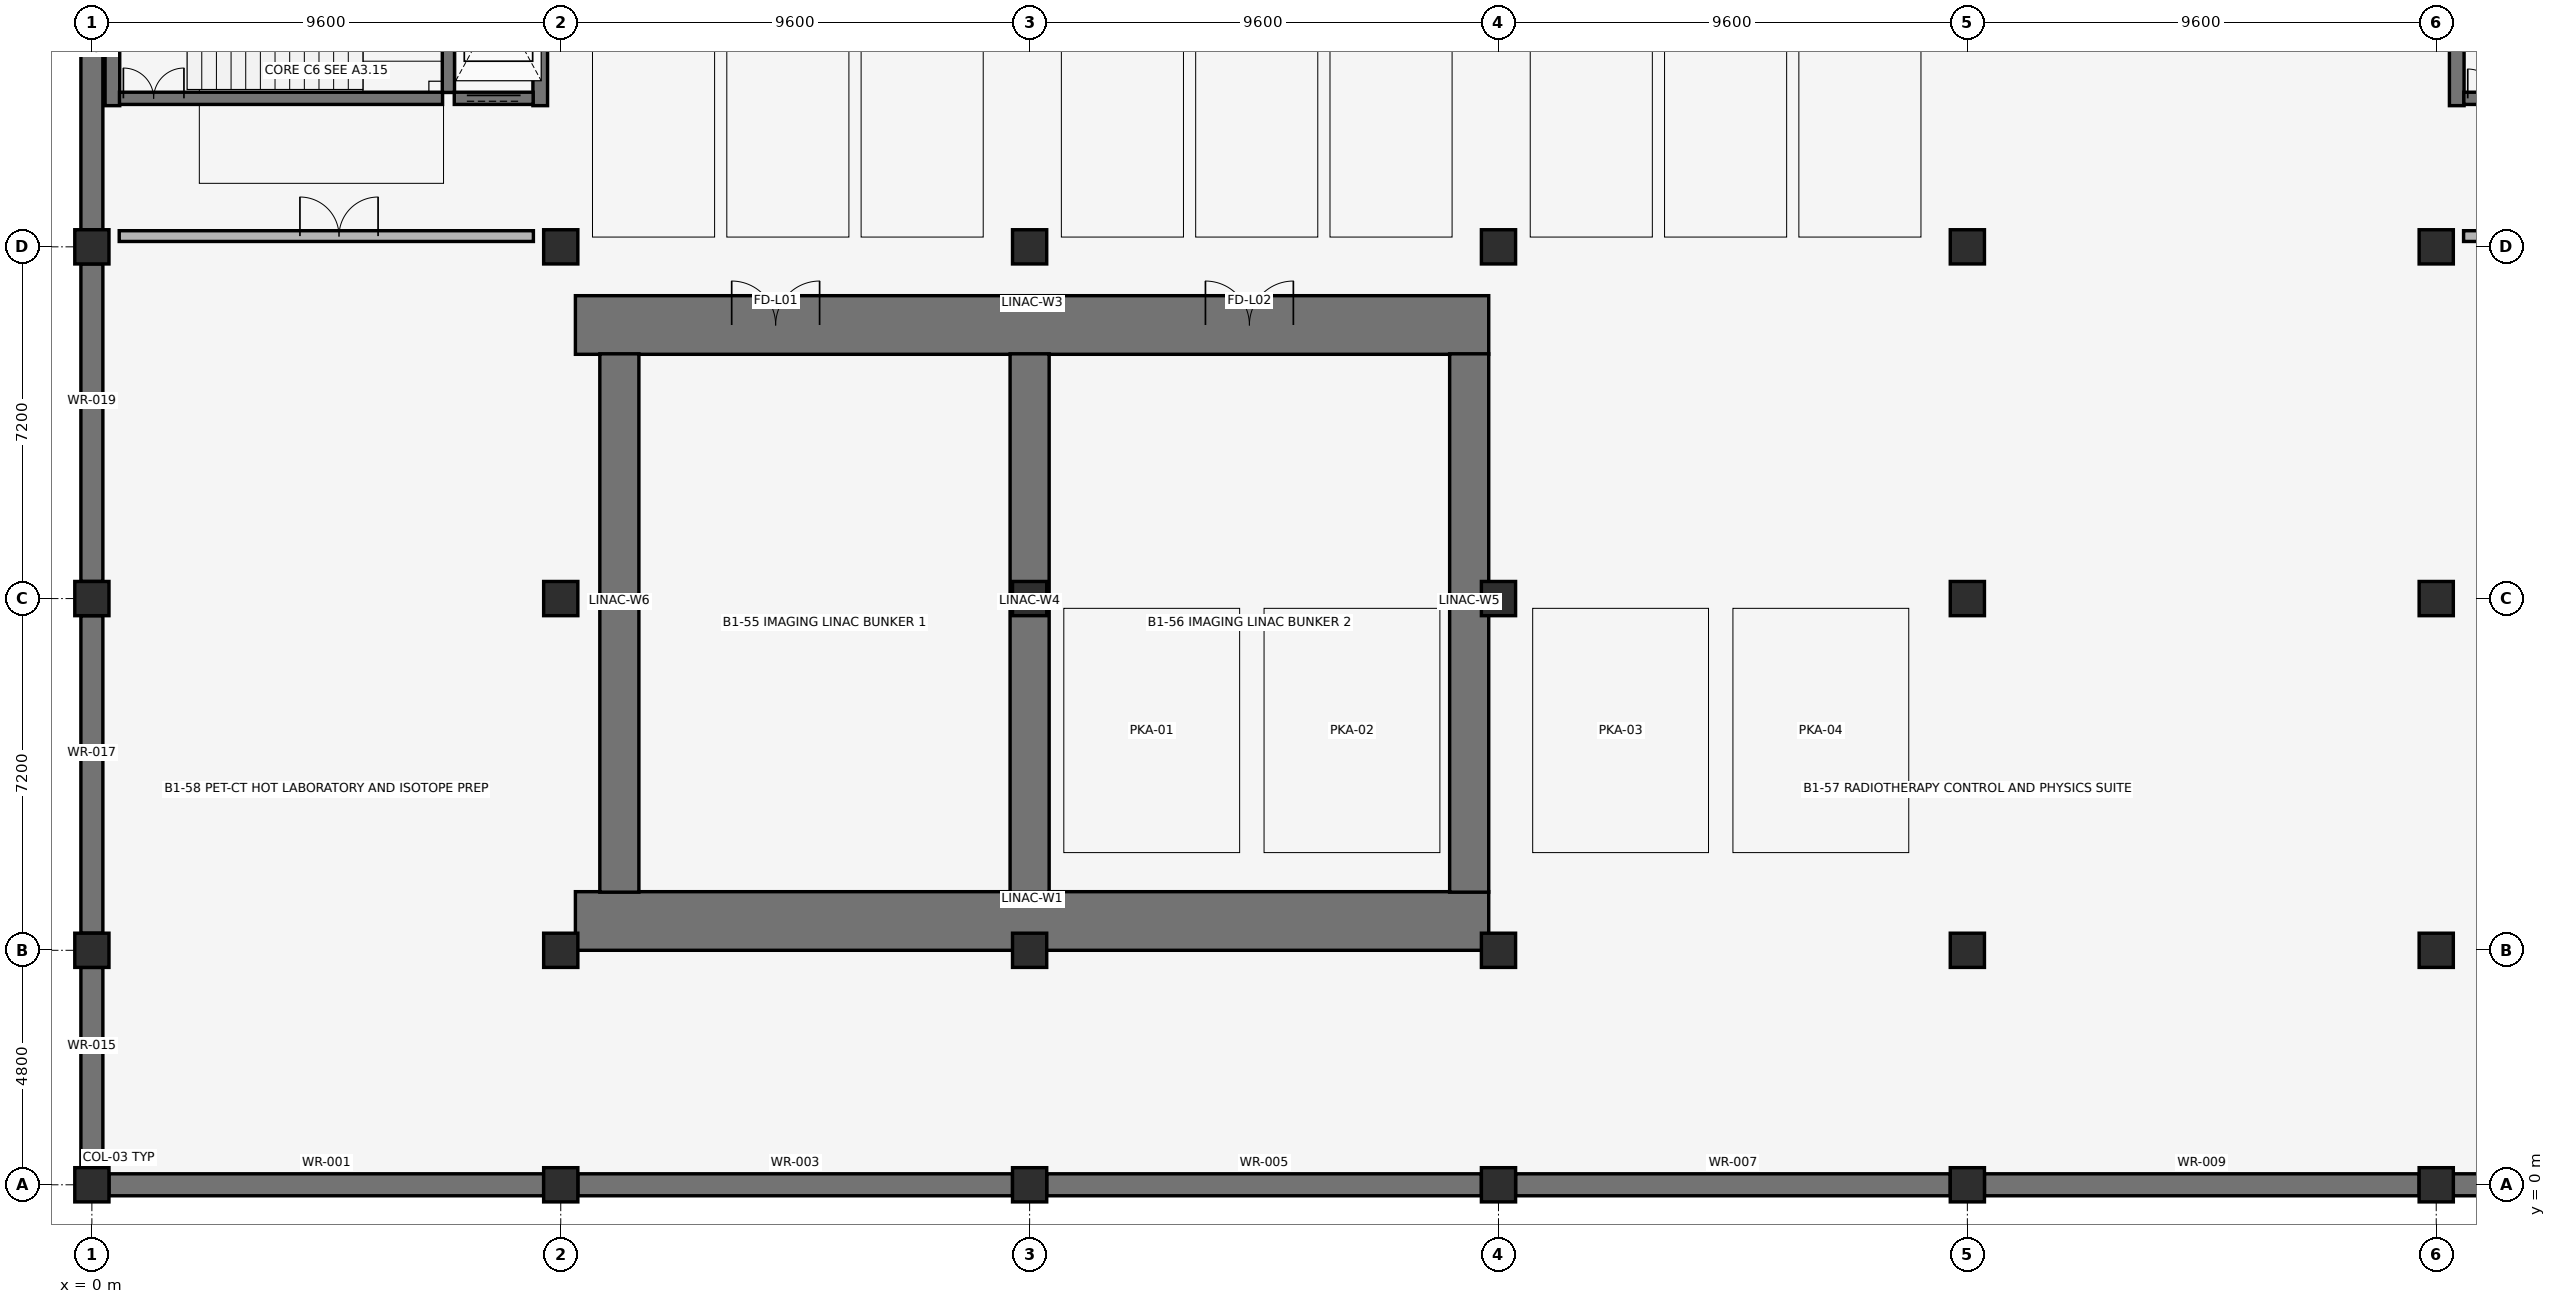
"""IFC4 building model, lengths in metres.
Left out: names, types, materials, properties, quantities, classifications, styles, units other than length and angle.
Written with IfcOpenShell. Run it as: python <this file> out.ifc"""

import sys

from ifc_helpers import new_model, si_unit, direction, frame, frame_2d, origin, origin_2d, place, context, subcontext, project, spatial, rectangle, extrude, element, fill, save


model = new_model("IFC4")
c1 = context("Model", 3, precision=1e-05, world=origin(), true_north=direction((0.0, 1.0)))
c2 = subcontext(c1, "Body", "Model", "MODEL_VIEW")
j1 = project(units=[si_unit("LENGTHUNIT", "METRE"), si_unit("PLANEANGLEUNIT", "RADIAN")], contexts=[c1])
p1 = place(None, origin())
s1 = spatial("IfcSite", under=j1, at=p1, CompositionType="ELEMENT")
p2 = place(p1, origin())
s2 = spatial("IfcBuilding", under=s1, at=p2, CompositionType="ELEMENT")
p3 = place(p2, frame((0.0, 0.0, -4.42)))
s3 = spatial("IfcBuildingStorey", under=s2, at=p3, CompositionType="ELEMENT", Elevation=-4.42)
for number, where, z_axis, x_axis in (
    (1, (0.0, 0.0, 0.0), (0.0, 0.0, 1.0), (1.0, 0.0, 0.0)),
    (2, (0.0, 4.8, 0.0), (0.0, 0.0, 1.0), (1.0, 0.0, 0.0)),
    (3, (0.0, 12.0, 0.0), (0.0, 0.0, 1.0), (1.0, 0.0, 0.0)),
    (4, (0.0, 19.2, 0.0), (0.0, 0.0, 1.0), (1.0, 0.0, 0.0)),
    (5, (9.6, 0.0, 0.0), (0.0, 0.0, 1.0), (1.0, 0.0, 0.0)),
    (6, (9.6, 4.8, 0.0), (0.0, 0.0, 1.0), (1.0, 0.0, 0.0)),
    (7, (9.6, 12.0, 0.0), (0.0, 0.0, 1.0), (1.0, 0.0, 0.0)),
    (8, (9.6, 19.2, 0.0), (0.0, 0.0, 1.0), (1.0, 0.0, 0.0)),
    (9, (19.2, 0.0, 0.0), (0.0, 0.0, 1.0), (1.0, 0.0, 0.0)),
    (10, (19.2, 4.8, 0.0), (0.0, 0.0, 1.0), (1.0, 0.0, 0.0)),
    (11, (19.2, 12.0, 0.0), (0.0, 0.0, 1.0), (1.0, 0.0, 0.0)),
    (12, (19.2, 19.2, 0.0), (0.0, 0.0, 1.0), (1.0, 0.0, 0.0)),
    (13, (28.8, 0.0, 0.0), (0.0, 0.0, 1.0), (1.0, 0.0, 0.0)),
    (14, (28.8, 4.8, 0.0), (0.0, 0.0, 1.0), (1.0, 0.0, 0.0)),
    (15, (28.8, 12.0, 0.0), (0.0, 0.0, 1.0), (1.0, 0.0, 0.0)),
    (16, (28.8, 19.2, 0.0), (0.0, 0.0, 1.0), (1.0, 0.0, 0.0)),
    (17, (38.4, 0.0, 0.0), (0.0, 0.0, 1.0), (1.0, 0.0, 0.0)),
    (18, (38.4, 4.8, 0.0), (0.0, 0.0, 1.0), (1.0, 0.0, 0.0)),
    (19, (38.4, 12.0, 0.0), (0.0, 0.0, 1.0), (1.0, 0.0, 0.0)),
    (20, (38.4, 19.2, 0.0), (0.0, 0.0, 1.0), (1.0, 0.0, 0.0)),
    (21, (48.0, 0.0, 0.0), (0.0, 0.0, 1.0), (1.0, 0.0, 0.0)),
    (22, (48.0, 4.8, 0.0), (0.0, 0.0, 1.0), (1.0, 0.0, 0.0)),
    (23, (48.0, 12.0, 0.0), (0.0, 0.0, 1.0), (1.0, 0.0, 0.0)),
    (24, (48.0, 19.2, 0.0), (0.0, 0.0, 1.0), (1.0, 0.0, 0.0)),
):
    element("IfcColumn", number, at=place(p3, frame(where, z_axis=z_axis, x_axis=x_axis)), inside=s3, PredefinedType="COLUMN", context=c2, shape_type="SweptSolid", body=[
        extrude(rectangle(XDim=0.7, YDim=0.7, at=origin_2d()), origin(), (0.0, 0.0, 1.0), 4.42),
    ])
p4 = place(p3, frame((0.35, 0.0, 0.0), z_axis=(0.0, 0.0, 1.0), x_axis=(1.0, 0.0, 0.0)))
e25 = element("IfcWall", 25, at=p4, inside=s3, PredefinedType="USERDEFINED", context=c2, shape_type="SweptSolid", body=[
    extrude(rectangle(XDim=8.9, YDim=0.45, at=frame_2d((4.45, 0.0))), origin(), (0.0, 0.0, 1.0), 3.27),
])
p5 = place(p3, frame((9.95, 0.0, 0.0), z_axis=(0.0, 0.0, 1.0), x_axis=(1.0, 0.0, 0.0)))
e26 = element("IfcWall", 26, at=p5, inside=s3, PredefinedType="USERDEFINED", context=c2, shape_type="SweptSolid", body=[
    extrude(rectangle(XDim=8.9, YDim=0.45, at=frame_2d((4.45, 0.0))), origin(), (0.0, 0.0, 1.0), 3.27),
])
p6 = place(p3, frame((19.55, 0.0, 0.0), z_axis=(0.0, 0.0, 1.0), x_axis=(1.0, 0.0, 0.0)))
e27 = element("IfcWall", 27, at=p6, inside=s3, PredefinedType="USERDEFINED", context=c2, shape_type="SweptSolid", body=[
    extrude(rectangle(XDim=8.9, YDim=0.45, at=frame_2d((4.45, 0.0))), origin(), (0.0, 0.0, 1.0), 3.27),
])
p7 = place(p3, frame((29.15, 0.0, 0.0), z_axis=(0.0, 0.0, 1.0), x_axis=(1.0, 0.0, 0.0)))
e28 = element("IfcWall", 28, at=p7, inside=s3, PredefinedType="USERDEFINED", context=c2, shape_type="SweptSolid", body=[
    extrude(rectangle(XDim=8.9, YDim=0.45, at=frame_2d((4.45, 0.0))), origin(), (0.0, 0.0, 1.0), 3.27),
])
for number, where, z_axis, x_axis in (
    (29, (38.75, 0.0, 0.0), (0.0, 0.0, 1.0), (1.0, 0.0, 0.0)),
    (30, (48.35, 0.0, 0.0), (0.0, 0.0, 1.0), (1.0, 0.0, 0.0)),
):
    element("IfcWall", number, at=place(p3, frame(where, z_axis=z_axis, x_axis=x_axis)), inside=s3, PredefinedType="USERDEFINED", context=c2, shape_type="SweptSolid", body=[
        extrude(rectangle(XDim=8.9, YDim=0.45, at=frame_2d((4.45, 0.0))), origin(), (0.0, 0.0, 1.0), 3.27),
    ])
p8 = place(p3, frame((0.0, 0.35, 0.0), z_axis=(0.0, 0.0, 1.0), x_axis=(0.0, 1.0, 0.0)))
e31 = element("IfcWall", 31, at=p8, inside=s3, PredefinedType="USERDEFINED", context=c2, shape_type="SweptSolid", body=[
    extrude(rectangle(XDim=4.1, YDim=0.45, at=frame_2d((2.05, 0.0))), origin(), (0.0, 0.0, 1.0), 3.27),
])
for number, where, z_axis, x_axis in (
    (32, (0.0, 5.15, 0.0), (0.0, 0.0, 1.0), (0.0, 1.0, 0.0)),
    (33, (0.0, 12.35, 0.0), (0.0, 0.0, 1.0), (0.0, 1.0, 0.0)),
    (34, (0.0, 19.55, 0.0), (0.0, 0.0, 1.0), (0.0, 1.0, 0.0)),
):
    element("IfcWall", number, at=place(p3, frame(where, z_axis=z_axis, x_axis=x_axis)), inside=s3, PredefinedType="USERDEFINED", context=c2, shape_type="SweptSolid", body=[
        extrude(rectangle(XDim=6.5, YDim=0.45, at=frame_2d((3.25, 0.0))), origin(), (0.0, 0.0, 1.0), 3.27),
    ])
p9 = place(p3, frame((9.9, 5.4, 0.0), z_axis=(0.0, 0.0, 1.0), x_axis=(1.0, 0.0, 0.0)))
e35 = element("IfcWall", 35, at=p9, inside=s3, PredefinedType="SHEAR", context=c2, shape_type="SweptSolid", body=[
    extrude(rectangle(XDim=18.7, YDim=1.2, at=frame_2d((9.35, 0.0))), origin(), (0.0, 0.0, 1.0), 3.17),
])
p10 = place(p3, frame((9.9, 17.6, 0.0), z_axis=(0.0, 0.0, 1.0), x_axis=(1.0, 0.0, 0.0)))
e36 = element("IfcWall", 36, at=p10, inside=s3, PredefinedType="SHEAR", context=c2, shape_type="SweptSolid", body=[
    extrude(rectangle(XDim=18.7, YDim=1.2, at=frame_2d((9.35, 0.0))), origin(), (0.0, 0.0, 1.0), 3.17),
])
p11 = place(p10, frame((3.2, 0.0, 0.0)))
e37 = element("IfcOpeningElement", 37, at=p11, cuts=e36, PredefinedType="OPENING", context=c2, shape_type="SweptSolid", body=[
    extrude(rectangle(XDim=1.8, YDim=2.2, at=frame_2d((0.9, 1.1))), frame((0.0, 0.61, 0.0), z_axis=(0.0, -1.0, 0.0), x_axis=(1.0, 0.0, 0.0)), (0.0, 0.0, 1.0), 1.22),
])
p12 = place(p10, frame((12.9, 0.0, 0.0)))
e38 = element("IfcOpeningElement", 38, at=p12, cuts=e36, PredefinedType="OPENING", context=c2, shape_type="SweptSolid", body=[
    extrude(rectangle(XDim=1.8, YDim=2.2, at=frame_2d((0.9, 1.1))), frame((0.0, 0.61, 0.0), z_axis=(0.0, -1.0, 0.0), x_axis=(1.0, 0.0, 0.0)), (0.0, 0.0, 1.0), 1.22),
])
for number, where, z_axis, x_axis in (
    (39, (19.2, 5.99, 0.0), (0.0, 0.0, 1.0), (0.0, 1.0, 0.0)),
    (40, (28.2, 5.99, 0.0), (0.0, 0.0, 1.0), (0.0, 1.0, 0.0)),
    (41, (10.8, 5.99, 0.0), (0.0, 0.0, 1.0), (0.0, 1.0, 0.0)),
):
    element("IfcWall", number, at=place(p3, frame(where, z_axis=z_axis, x_axis=x_axis)), inside=s3, PredefinedType="SHEAR", context=c2, shape_type="SweptSolid", body=[
        extrude(rectangle(XDim=11.02, YDim=0.8, at=frame_2d((5.51, 0.0))), origin(), (0.0, 0.0, 1.0), 3.17),
    ])
for number, where, z_axis, x_axis in (
    (42, (0.42, 22.09, 0.0), (0.0, 0.0, 1.0), (0.0, 1.0, 0.0)),
    (43, (9.18, 22.09, 0.0), (0.0, 0.0, 1.0), (0.0, 1.0, 0.0)),
):
    element("IfcWall", number, at=place(p3, frame(where, z_axis=z_axis, x_axis=x_axis)), inside=s3, PredefinedType="SHEAR", context=c2, shape_type="SweptSolid", body=[
        extrude(rectangle(XDim=4.1, YDim=0.3, at=frame_2d((2.05, 0.0))), origin(), (0.0, 0.0, 1.0), 4.06),
    ])
p13 = place(p3, frame((7.3, 22.36, 0.0), z_axis=(0.0, 0.0, 1.0), x_axis=(0.0, 1.0, 0.0)))
e44 = element("IfcWall", 44, at=p13, inside=s3, PredefinedType="SHEAR", context=c2, shape_type="SweptSolid", body=[
    extrude(rectangle(XDim=3.53, YDim=0.25, at=frame_2d((1.765, 0.0))), origin(), (0.0, 0.0, 1.0), 4.06),
])
p14 = place(p3, frame((0.565, 22.24, 0.0), z_axis=(0.0, 0.0, 1.0), x_axis=(1.0, 0.0, 0.0)))
e45 = element("IfcWall", 45, at=p14, inside=s3, PredefinedType="SHEAR", context=c2, shape_type="SweptSolid", body=[
    extrude(rectangle(XDim=6.615, YDim=0.25, at=frame_2d((3.308, 0.0))), origin(), (0.0, 0.0, 1.0), 4.06),
])
p15 = place(p14, frame((0.08, 0.0, 0.0)))
e46 = element("IfcOpeningElement", 46, at=p15, cuts=e45, PredefinedType="OPENING", context=c2, shape_type="SweptSolid", body=[
    extrude(rectangle(XDim=1.24, YDim=2.15, at=frame_2d((0.62, 1.075))), frame((0.0, 0.135, 0.0), z_axis=(0.0, -1.0, 0.0), x_axis=(1.0, 0.0, 0.0)), (0.0, 0.0, 1.0), 0.27),
])
p16 = place(p3, frame((0.56, 19.42, 0.0), z_axis=(0.0, 0.0, 1.0), x_axis=(1.0, 0.0, 0.0)))
e47 = element("IfcWall", 47, at=p16, inside=s3, PredefinedType="PARTITIONING", context=c2, shape_type="SweptSolid", body=[
    extrude(rectangle(XDim=8.48, YDim=0.22, at=frame_2d((4.24, 0.0))), origin(), (0.0, 0.0, 1.0), 3.21),
])
p17 = place(p16, frame((3.7, 0.0, 0.0)))
e48 = element("IfcOpeningElement", 48, at=p17, cuts=e47, PredefinedType="OPENING", context=c2, shape_type="SweptSolid", body=[
    extrude(rectangle(XDim=1.6, YDim=2.2, at=frame_2d((0.8, 1.1))), frame((0.0, 0.12, 0.0), z_axis=(0.0, -1.0, 0.0), x_axis=(1.0, 0.0, 0.0)), (0.0, 0.0, 1.0), 0.24),
])
p18 = place(p3, frame((7.42, 22.24, 0.0), z_axis=(0.0, 0.0, 1.0), x_axis=(1.0, 0.0, 0.0)))
e49 = element("IfcWall", 49, at=p18, inside=s3, PredefinedType="SHEAR", context=c2, shape_type="SweptSolid", body=[
    extrude(rectangle(XDim=1.615, YDim=0.25, at=frame_2d((0.808, 0.0))), origin(), (0.0, 0.0, 1.0), 4.06),
])
p19 = place(p18, frame((0.258, 0.0, 0.0)))
e50 = element("IfcOpeningElement", 50, at=p19, cuts=e49, PredefinedType="OPENING", context=c2, shape_type="SweptSolid", body=[
    extrude(rectangle(XDim=1.1, YDim=2.15, at=frame_2d((0.55, 1.075))), frame((0.0, 0.135, 0.0), z_axis=(0.0, -1.0, 0.0), x_axis=(1.0, 0.0, 0.0)), (0.0, 0.0, 1.0), 0.27),
])
p20 = place(p3, frame((48.42, 22.09, 0.0), z_axis=(0.0, 0.0, 1.0), x_axis=(0.0, 1.0, 0.0)))
e51 = element("IfcWall", 51, at=p20, inside=s3, PredefinedType="SHEAR", context=c2, shape_type="SweptSolid", body=[
    extrude(rectangle(XDim=4.1, YDim=0.3, at=frame_2d((2.05, 0.0))), origin(), (0.0, 0.0, 1.0), 4.06),
])
p21 = place(p3, frame((48.565, 22.24, 0.0), z_axis=(0.0, 0.0, 1.0), x_axis=(1.0, 0.0, 0.0)))
e52 = element("IfcWall", 52, at=p21, inside=s3, PredefinedType="SHEAR", context=c2, shape_type="SweptSolid", body=[
    extrude(rectangle(XDim=6.615, YDim=0.25, at=frame_2d((3.308, 0.0))), origin(), (0.0, 0.0, 1.0), 4.06),
])
p22 = place(p21, frame((0.08, 0.0, 0.0)))
e53 = element("IfcOpeningElement", 53, at=p22, cuts=e52, PredefinedType="OPENING", context=c2, shape_type="SweptSolid", body=[
    extrude(rectangle(XDim=1.2, YDim=2.15, at=frame_2d((0.6, 1.075))), frame((0.0, 0.135, 0.0), z_axis=(0.0, -1.0, 0.0), x_axis=(1.0, 0.0, 0.0)), (0.0, 0.0, 1.0), 0.27),
])
p23 = place(p3, frame((48.56, 19.42, 0.0), z_axis=(0.0, 0.0, 1.0), x_axis=(1.0, 0.0, 0.0)))
e54 = element("IfcWall", 54, at=p23, inside=s3, PredefinedType="PARTITIONING", context=c2, shape_type="SweptSolid", body=[
    extrude(rectangle(XDim=8.48, YDim=0.22, at=frame_2d((4.24, 0.0))), origin(), (0.0, 0.0, 1.0), 3.21),
])
p24 = place(p23, frame((3.7, 0.0, 0.0)))
e55 = element("IfcOpeningElement", 55, at=p24, cuts=e54, PredefinedType="OPENING", context=c2, shape_type="SweptSolid", body=[
    extrude(rectangle(XDim=1.6, YDim=2.2, at=frame_2d((0.8, 1.1))), frame((0.0, 0.12, 0.0), z_axis=(0.0, -1.0, 0.0), x_axis=(1.0, 0.0, 0.0)), (0.0, 0.0, 1.0), 0.24),
])
p25 = place(p15, origin())
e56 = element("IfcDoor", 56, at=p25, inside=s3, OperationType="DOUBLE_DOOR_SINGLE_SWING", PredefinedType="DOOR", context=c2, shape_type="SweptSolid", body=[
    extrude(rectangle(XDim=1.24, YDim=2.15, at=frame_2d((0.62, 1.075))), frame((0.0, 0.025, 0.0), z_axis=(0.0, -1.0, 0.0), x_axis=(1.0, 0.0, 0.0)), (0.0, 0.0, 1.0), 0.05),
])
fill(e46, e56)
p26 = place(p17, origin())
e57 = element("IfcDoor", 57, at=p26, inside=s3, OperationType="DOUBLE_DOOR_SINGLE_SWING", PredefinedType="DOOR", context=c2, shape_type="SweptSolid", body=[
    extrude(rectangle(XDim=1.6, YDim=2.2, at=frame_2d((0.8, 1.1))), frame((0.0, 0.025, 0.0), z_axis=(0.0, -1.0, 0.0), x_axis=(1.0, 0.0, 0.0)), (0.0, 0.0, 1.0), 0.05),
])
fill(e48, e57)
p27 = place(p19, origin())
e58 = element("IfcDoor", 58, at=p27, inside=s3, OperationType="DOUBLE_DOOR_SLIDING", PredefinedType="DOOR", context=c2, shape_type="SweptSolid", body=[
    extrude(rectangle(XDim=1.1, YDim=2.15, at=frame_2d((0.55, 1.075))), frame((0.0, 0.025, 0.0), z_axis=(0.0, -1.0, 0.0), x_axis=(1.0, 0.0, 0.0)), (0.0, 0.0, 1.0), 0.05),
])
fill(e50, e58)
p28 = place(p22, origin())
e59 = element("IfcDoor", 59, at=p28, inside=s3, OperationType="DOUBLE_DOOR_SINGLE_SWING", PredefinedType="DOOR", context=c2, shape_type="SweptSolid", body=[
    extrude(rectangle(XDim=1.2, YDim=2.15, at=frame_2d((0.6, 1.075))), frame((0.0, 0.025, 0.0), z_axis=(0.0, -1.0, 0.0), x_axis=(1.0, 0.0, 0.0)), (0.0, 0.0, 1.0), 0.05),
])
fill(e53, e59)
p29 = place(p11, origin())
e60 = element("IfcDoor", 60, at=p29, inside=s3, OperationType="DOUBLE_DOOR_SINGLE_SWING", PredefinedType="DOOR", context=c2, shape_type="SweptSolid", body=[
    extrude(rectangle(XDim=1.8, YDim=2.2, at=frame_2d((0.9, 1.1))), frame((0.0, 0.025, 0.0), z_axis=(0.0, -1.0, 0.0), x_axis=(1.0, 0.0, 0.0)), (0.0, 0.0, 1.0), 0.05),
])
fill(e37, e60)
p30 = place(p12, origin())
e61 = element("IfcDoor", 61, at=p30, inside=s3, OperationType="DOUBLE_DOOR_SINGLE_SWING", PredefinedType="DOOR", context=c2, shape_type="SweptSolid", body=[
    extrude(rectangle(XDim=1.8, YDim=2.2, at=frame_2d((0.9, 1.1))), frame((0.0, 0.025, 0.0), z_axis=(0.0, -1.0, 0.0), x_axis=(1.0, 0.0, 0.0)), (0.0, 0.0, 1.0), 0.05),
])
fill(e38, e61)
save(model, sys.argv[1])
